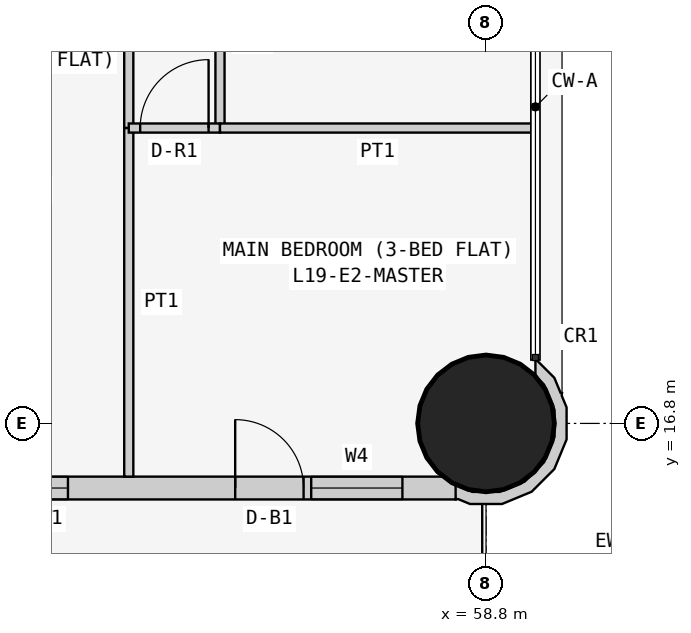
"""IFC4 building model, lengths in metres.
Left out: names, types, materials, properties, quantities, classifications, styles, units other than length and angle.
Written with IfcOpenShell. Run it as: python <this file> out.ifc"""

import sys

from ifc_helpers import new_model, si_unit, direction, frame, frame_2d, origin, origin_2d, place, context, subcontext, project, spatial, polyline, rectangle, circle, outline, extrude, element, fill, save


model = new_model("IFC4")
c1 = context("Model", 3, precision=1e-05, world=origin(), true_north=direction((0.0, 1.0)))
c2 = subcontext(c1, "Body", "Model", "MODEL_VIEW")
j1 = project(units=[si_unit("LENGTHUNIT", "METRE"), si_unit("PLANEANGLEUNIT", "RADIAN")], contexts=[c1])
p1 = place(None, origin())
s1 = spatial("IfcSite", under=j1, at=p1, CompositionType="ELEMENT")
p2 = place(p1, origin())
s2 = spatial("IfcBuilding", under=s1, at=p2, CompositionType="ELEMENT")
p3 = place(p2, frame((0.0, 0.0, 77.7)))
s3 = spatial("IfcBuildingStorey", under=s2, at=p3, CompositionType="ELEMENT", Elevation=77.7)
p4 = place(p3, frame((58.8, 16.8, 0.0), z_axis=(0.0, 0.0, 1.0), x_axis=(1.0, 0.0, 0.0)))
e1 = element("IfcColumn", 1, at=p4, inside=s3, PredefinedType="COLUMN", context=c2, shape_type="SweptSolid", body=[
    extrude(circle(Radius=0.9, at=origin_2d()), origin(), (0.0, 0.0, 1.0), 3.6),
])
p5 = place(p3, frame((43.0, 15.95, 0.0), z_axis=(0.0, 0.0, 1.0), x_axis=(1.0, 0.0, 0.0)))
e2 = element("IfcWall", 2, at=p5, inside=s3, PredefinedType="SOLIDWALL", context=c2, shape_type="SweptSolid", body=[
    extrude(rectangle(XDim=15.4, YDim=0.3, at=frame_2d((7.7, 0.0))), origin(), (0.0, 0.0, 1.0), 3.45),
])
p6 = place(p5, frame((1.2, 0.0, 0.9)))
e3 = element("IfcOpeningElement", 3, at=p6, cuts=e2, PredefinedType="OPENING", context=c2, shape_type="SweptSolid", body=[
    extrude(rectangle(XDim=1.8, YDim=1.5, at=frame_2d((0.9, 0.75))), frame((0.0, 0.16, 0.0), z_axis=(0.0, -1.0, 0.0), x_axis=(1.0, 0.0, 0.0)), (0.0, 0.0, 1.0), 0.32),
])
p7 = place(p5, frame((4.95, 0.0, 1.5)))
e4 = element("IfcOpeningElement", 4, at=p7, cuts=e2, PredefinedType="OPENING", context=c2, shape_type="SweptSolid", body=[
    extrude(rectangle(XDim=0.9, YDim=0.7, at=frame_2d((0.45, 0.35))), frame((0.0, 0.16, 0.0), z_axis=(0.0, -1.0, 0.0), x_axis=(1.0, 0.0, 0.0)), (0.0, 0.0, 1.0), 0.32),
])
p8 = place(p5, frame((8.5, 0.0, 0.9)))
e5 = element("IfcOpeningElement", 5, at=p8, cuts=e2, PredefinedType="OPENING", context=c2, shape_type="SweptSolid", body=[
    extrude(rectangle(XDim=1.8, YDim=1.5, at=frame_2d((0.9, 0.75))), frame((0.0, 0.16, 0.0), z_axis=(0.0, -1.0, 0.0), x_axis=(1.0, 0.0, 0.0)), (0.0, 0.0, 1.0), 0.32),
])
p9 = place(p5, frame((12.5, 0.0, 0.0)))
e6 = element("IfcOpeningElement", 6, at=p9, cuts=e2, PredefinedType="OPENING", context=c2, shape_type="SweptSolid", body=[
    extrude(rectangle(XDim=0.9, YDim=2.4, at=frame_2d((0.45, 1.2))), frame((0.0, 0.16, 0.0), z_axis=(0.0, -1.0, 0.0), x_axis=(1.0, 0.0, 0.0)), (0.0, 0.0, 1.0), 0.32),
])
p10 = place(p5, frame((13.5, 0.0, 0.9)))
e7 = element("IfcOpeningElement", 7, at=p10, cuts=e2, PredefinedType="OPENING", context=c2, shape_type="SweptSolid", body=[
    extrude(rectangle(XDim=1.2, YDim=1.5, at=frame_2d((0.6, 0.75))), frame((0.0, 0.16, 0.0), z_axis=(0.0, -1.0, 0.0), x_axis=(1.0, 0.0, 0.0)), (0.0, 0.0, 1.0), 0.32),
])
p11 = place(p3, frame((58.436, 15.89, 0.0), z_axis=(0.0, 0.0, 1.0), x_axis=(0.926129809145, -0.377204953059, 0.0)))
e8 = element("IfcWall", 8, at=p11, inside=s3, PredefinedType="SOLIDWALL", context=c2, shape_type="SweptSolid", body=[
    extrude(outline(polyline([(0.769, 1.728), (0.75, 1.723), (0.6, 1.875), (0.295, 2.004), (0.281, 1.998), (0.36, 1.803), (0.509, 1.741), (0.761, 1.486), (0.896, 1.154), (0.894, 0.795), (0.755, 0.465), (0.5, 0.213), (0.168, 0.078), (-0.1, 0.08), (0.0, -0.097), (0.03, -0.08), (0.198, -0.081), (0.589, 0.078), (0.889, 0.374), (1.052, 0.763), (1.055, 1.185), (0.896, 1.575), (0.778, 1.695), (0.769, 1.728)])), origin(), (0.0, 0.0, 1.0), 3.45),
])
p12 = place(p3, frame((54.1, 22.971, 0.0), z_axis=(0.0, 0.0, 1.0), x_axis=(0.0, -1.0, 0.0)))
e9 = element("IfcWall", 9, at=p12, inside=s3, PredefinedType="PARTITIONING", context=c2, shape_type="SweptSolid", body=[
    extrude(rectangle(XDim=2.285, YDim=0.12, at=frame_2d((1.143, 0.0))), origin(), (0.0, 0.0, 1.0), 3.45),
])
p13 = place(p3, frame((54.1, 20.686, 0.0), z_axis=(0.0, 0.0, 1.0), x_axis=(0.0, -1.0, 0.0)))
e10 = element("IfcWall", 10, at=p13, inside=s3, PredefinedType="PARTITIONING", context=c2, shape_type="SweptSolid", body=[
    extrude(rectangle(XDim=4.586, YDim=0.12, at=frame_2d((2.293, 0.0))), origin(), (0.0, 0.0, 1.0), 3.45),
])
p14 = place(p3, frame((55.3, 22.971, 0.0), z_axis=(0.0, 0.0, 1.0), x_axis=(0.0, -1.0, 0.0)))
e11 = element("IfcWall", 11, at=p14, inside=s3, PredefinedType="PARTITIONING", context=c2, shape_type="SweptSolid", body=[
    extrude(rectangle(XDim=2.285, YDim=0.12, at=frame_2d((1.143, 0.0))), origin(), (0.0, 0.0, 1.0), 3.45),
])
p15 = place(p3, frame((55.3, 20.686, 0.0), z_axis=(0.0, 0.0, 1.0), x_axis=(-1.0, 0.0, 0.0)))
e12 = element("IfcWall", 12, at=p15, inside=s3, PredefinedType="PARTITIONING", context=c2, shape_type="SweptSolid", body=[
    extrude(rectangle(XDim=1.2, YDim=0.12, at=frame_2d((0.6, 0.0))), origin(), (0.0, 0.0, 1.0), 3.45),
])
p16 = place(p15, frame((0.15, 0.0, 0.0)))
e13 = element("IfcOpeningElement", 13, at=p16, cuts=e12, PredefinedType="OPENING", context=c2, shape_type="SweptSolid", body=[
    extrude(rectangle(XDim=0.9, YDim=2.1, at=frame_2d((0.45, 1.05))), frame((0.0, 0.07, 0.0), z_axis=(0.0, -1.0, 0.0), x_axis=(1.0, 0.0, 0.0)), (0.0, 0.0, 1.0), 0.14),
])
p17 = place(p3, frame((59.45, 20.686, 0.0), z_axis=(0.0, 0.0, 1.0), x_axis=(-1.0, 0.0, 0.0)))
e14 = element("IfcWall", 14, at=p17, inside=s3, PredefinedType="PARTITIONING", context=c2, shape_type="SweptSolid", body=[
    extrude(rectangle(XDim=4.15, YDim=0.12, at=frame_2d((2.075, 0.0))), origin(), (0.0, 0.0, 1.0), 3.45),
])
p18 = place(p8, origin())
e15 = element("IfcWindow", 15, at=p18, inside=s3, PartitioningType="SINGLE_PANEL", PredefinedType="WINDOW", context=c2, shape_type="SweptSolid", body=[
    extrude(rectangle(XDim=1.8, YDim=1.5, at=frame_2d((0.9, 0.75))), frame((0.0, 0.03, 0.0), z_axis=(0.0, -1.0, 0.0), x_axis=(1.0, 0.0, 0.0)), (0.0, 0.0, 1.0), 0.06),
])
fill(e5, e15)
p19 = place(p9, origin())
e16 = element("IfcDoor", 16, at=p19, inside=s3, OperationType="SINGLE_SWING_LEFT", PredefinedType="DOOR", context=c2, shape_type="SweptSolid", body=[
    extrude(rectangle(XDim=0.9, YDim=2.4, at=frame_2d((0.45, 1.2))), frame((0.0, 0.025, 0.0), z_axis=(0.0, -1.0, 0.0), x_axis=(1.0, 0.0, 0.0)), (0.0, 0.0, 1.0), 0.05),
])
fill(e6, e16)
p20 = place(p10, origin())
e17 = element("IfcWindow", 17, at=p20, inside=s3, PartitioningType="SINGLE_PANEL", PredefinedType="WINDOW", context=c2, shape_type="SweptSolid", body=[
    extrude(rectangle(XDim=1.2, YDim=1.5, at=frame_2d((0.6, 0.75))), frame((0.0, 0.03, 0.0), z_axis=(0.0, -1.0, 0.0), x_axis=(1.0, 0.0, 0.0)), (0.0, 0.0, 1.0), 0.06),
])
fill(e7, e17)
p21 = place(p16, frame((0.9, 0.0, 0.0), z_axis=(0.0, 0.0, 1.0), x_axis=(-1.0, 0.0, 0.0)))
e18 = element("IfcDoor", 18, at=p21, inside=s3, OperationType="SINGLE_SWING_RIGHT", PredefinedType="DOOR", context=c2, shape_type="SweptSolid", body=[
    extrude(rectangle(XDim=0.9, YDim=2.1, at=frame_2d((0.45, 1.05))), frame((0.0, 0.025, 0.0), z_axis=(0.0, -1.0, 0.0), x_axis=(1.0, 0.0, 0.0)), (0.0, 0.0, 1.0), 0.05),
])
fill(e13, e18)
save(model, sys.argv[1])
